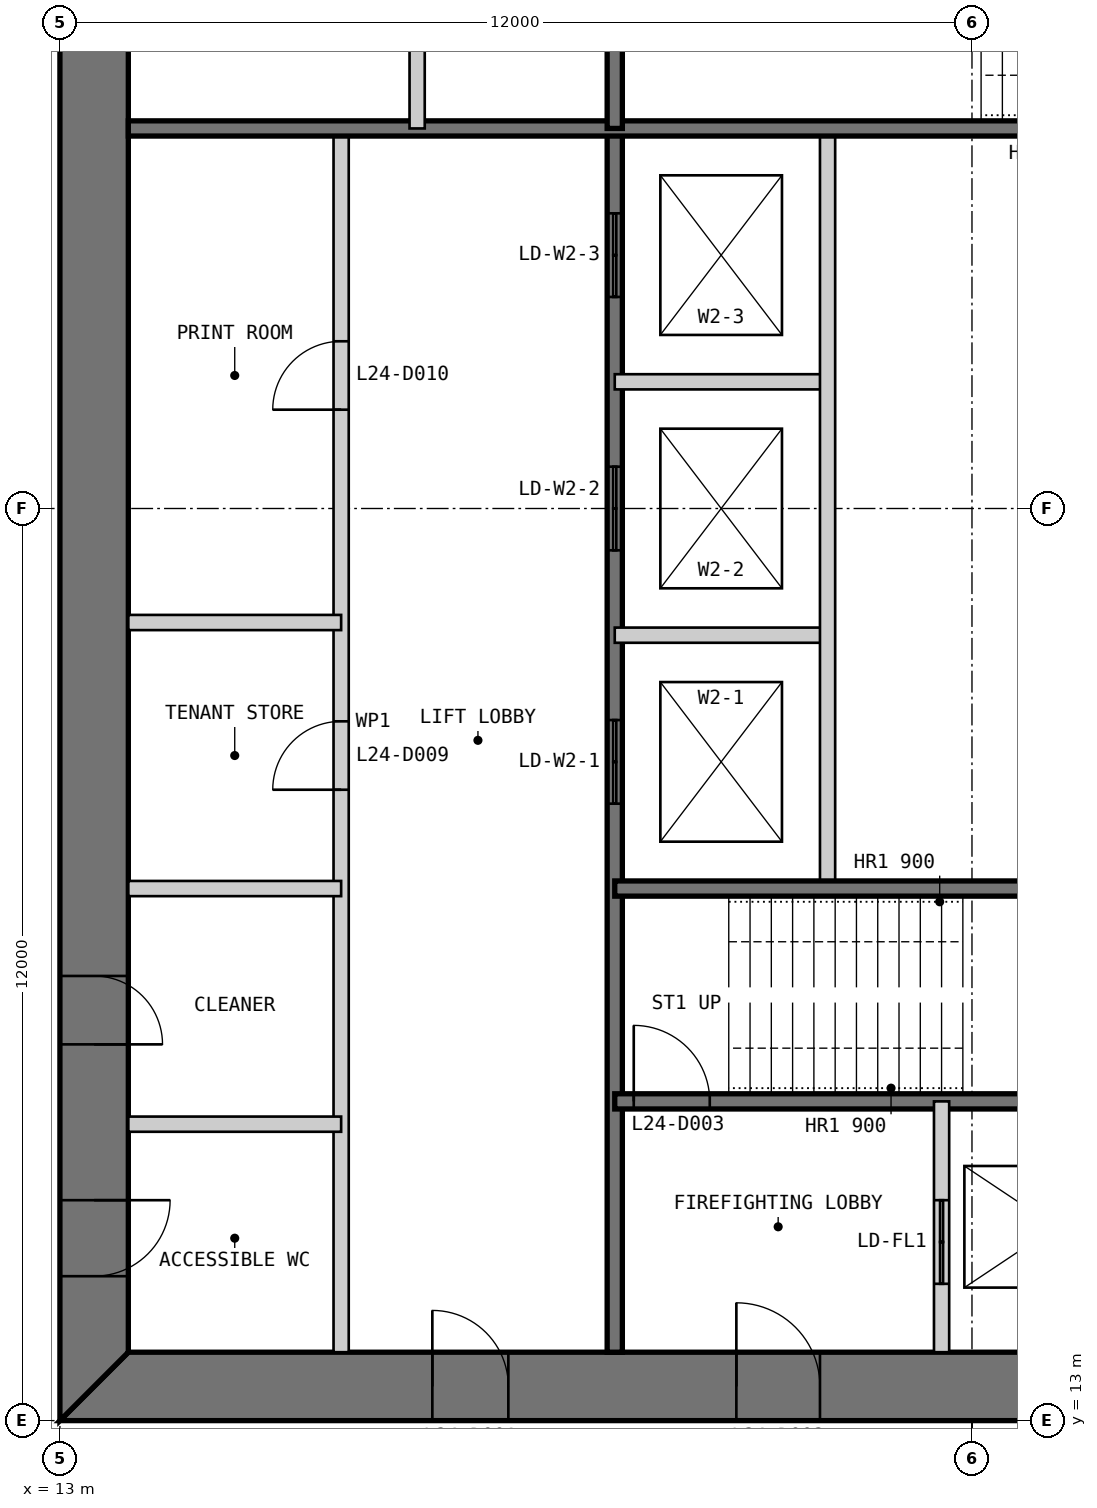
"""IFC4 building model, lengths in metres.
Left out: names, types, materials, properties, quantities, classifications, styles, units other than length and angle.
Written with IfcOpenShell. Run it as: python <this file> out.ifc"""

import sys

from ifc_helpers import new_model, si_unit, direction, frame, frame_2d, origin, place, context, subcontext, project, spatial, polyline, rectangle, outline, extrude, element, fill, save


model = new_model("IFC4")
c1 = context("Model", 3, precision=1e-05, world=origin(), true_north=direction((0.0, 1.0)))
c2 = subcontext(c1, "Body", "Model", "MODEL_VIEW")
j1 = project(units=[si_unit("LENGTHUNIT", "METRE"), si_unit("PLANEANGLEUNIT", "RADIAN")], contexts=[c1])
p1 = place(None, origin())
s1 = spatial("IfcSite", under=j1, at=p1, CompositionType="ELEMENT")
p2 = place(p1, origin())
s2 = spatial("IfcBuilding", under=s1, at=p2, CompositionType="ELEMENT")
p3 = place(p2, frame((0.0, 0.0, 106.4)))
s3 = spatial("IfcBuildingStorey", under=s2, at=p3, CompositionType="ELEMENT", Elevation=106.4)
p4 = place(p3, frame((13.0, 13.45, 0.0), z_axis=(0.0, 0.0, 1.0), x_axis=(1.0, 0.0, 0.0)))
e1 = element("IfcWall", 1, at=p4, inside=s3, PredefinedType="SHEAR", context=c2, shape_type="SweptSolid", body=[
    extrude(outline(polyline([(0.0, -0.45), (24.0, -0.45), (23.1, 0.45), (0.9, 0.45), (0.0, -0.45)])), origin(), (0.0, 0.0, 1.0), 4.0),
])
p5 = place(p4, frame((4.9, 0.0, 0.0)))
e2 = element("IfcOpeningElement", 2, at=p5, cuts=e1, PredefinedType="OPENING", context=c2, shape_type="SweptSolid", body=[
    extrude(rectangle(XDim=1.0, YDim=2.2, at=frame_2d((0.5, 1.1))), frame((0.0, 0.46, 0.0), z_axis=(0.0, -1.0, 0.0), x_axis=(1.0, 0.0, 0.0)), (0.0, 0.0, 1.0), 0.92),
])
p6 = place(p4, frame((8.9, 0.0, 0.0)))
e3 = element("IfcOpeningElement", 3, at=p6, cuts=e1, PredefinedType="OPENING", context=c2, shape_type="SweptSolid", body=[
    extrude(rectangle(XDim=1.1, YDim=2.2, at=frame_2d((0.55, 1.1))), frame((0.0, 0.46, 0.0), z_axis=(0.0, -1.0, 0.0), x_axis=(1.0, 0.0, 0.0)), (0.0, 0.0, 1.0), 0.92),
])
p7 = place(p4, frame((15.05, 0.0, 0.0)))
e4 = element("IfcOpeningElement", 4, at=p7, cuts=e1, PredefinedType="OPENING", context=c2, shape_type="SweptSolid", body=[
    extrude(rectangle(XDim=0.9, YDim=2.2, at=frame_2d((0.45, 1.1))), frame((0.0, 0.46, 0.0), z_axis=(0.0, -1.0, 0.0), x_axis=(1.0, 0.0, 0.0)), (0.0, 0.0, 1.0), 0.92),
])
p8 = place(p4, frame((17.9, 0.0, 0.0)))
e5 = element("IfcOpeningElement", 5, at=p8, cuts=e1, PredefinedType="OPENING", context=c2, shape_type="SweptSolid", body=[
    extrude(rectangle(XDim=1.0, YDim=2.2, at=frame_2d((0.5, 1.1))), frame((0.0, 0.46, 0.0), z_axis=(0.0, -1.0, 0.0), x_axis=(1.0, 0.0, 0.0)), (0.0, 0.0, 1.0), 0.92),
])
p9 = place(p4, frame((21.4, 0.0, 0.0)))
e6 = element("IfcOpeningElement", 6, at=p9, cuts=e1, PredefinedType="OPENING", context=c2, shape_type="SweptSolid", body=[
    extrude(rectangle(XDim=1.0, YDim=2.2, at=frame_2d((0.5, 1.1))), frame((0.0, 0.46, 0.0), z_axis=(0.0, -1.0, 0.0), x_axis=(1.0, 0.0, 0.0)), (0.0, 0.0, 1.0), 0.92),
])
p10 = place(p3, frame((13.45, 36.1, 0.0), z_axis=(0.0, 0.0, 1.0), x_axis=(0.0, -1.0, 0.0)))
e7 = element("IfcWall", 7, at=p10, inside=s3, PredefinedType="SHEAR", context=c2, shape_type="SweptSolid", body=[
    extrude(outline(polyline([(-0.9, -0.45), (23.1, -0.45), (22.2, 0.45), (0.0, 0.45), (-0.9, -0.45)])), origin(), (0.0, 0.0, 1.0), 4.0),
])
p11 = place(p10, frame((20.2, 0.0, 0.0)))
e8 = element("IfcOpeningElement", 8, at=p11, cuts=e7, PredefinedType="OPENING", context=c2, shape_type="SweptSolid", body=[
    extrude(rectangle(XDim=1.0, YDim=2.2, at=frame_2d((0.5, 1.1))), frame((0.0, 0.46, 0.0), z_axis=(0.0, -1.0, 0.0), x_axis=(1.0, 0.0, 0.0)), (0.0, 0.0, 1.0), 0.92),
])
p12 = place(p10, frame((17.25, 0.0, 0.0)))
e9 = element("IfcOpeningElement", 9, at=p12, cuts=e7, PredefinedType="OPENING", context=c2, shape_type="SweptSolid", body=[
    extrude(rectangle(XDim=0.9, YDim=2.2, at=frame_2d((0.45, 1.1))), frame((0.0, 0.46, 0.0), z_axis=(0.0, -1.0, 0.0), x_axis=(1.0, 0.0, 0.0)), (0.0, 0.0, 1.0), 0.92),
])
p13 = place(p3, frame((16.7, 13.9, 0.0), z_axis=(0.0, 0.0, 1.0), x_axis=(0.0, 1.0, 0.0)))
e10 = element("IfcWall", 10, at=p13, inside=s3, PredefinedType="PARTITIONING", context=c2, shape_type="SweptSolid", body=[
    extrude(rectangle(XDim=16.1, YDim=0.2, at=frame_2d((8.05, 0.0))), origin(), (0.0, 0.0, 1.0), 3.8),
])
p14 = place(p13, frame((7.4, 0.0, 0.0)))
e11 = element("IfcOpeningElement", 11, at=p14, cuts=e10, PredefinedType="OPENING", context=c2, shape_type="SweptSolid", body=[
    extrude(rectangle(XDim=0.9, YDim=2.2, at=frame_2d((0.45, 1.1))), frame((0.0, 0.11, 0.0), z_axis=(0.0, -1.0, 0.0), x_axis=(1.0, 0.0, 0.0)), (0.0, 0.0, 1.0), 0.22),
])
p15 = place(p13, frame((12.4, 0.0, 0.0)))
e12 = element("IfcOpeningElement", 12, at=p15, cuts=e10, PredefinedType="OPENING", context=c2, shape_type="SweptSolid", body=[
    extrude(rectangle(XDim=0.9, YDim=2.2, at=frame_2d((0.45, 1.1))), frame((0.0, 0.11, 0.0), z_axis=(0.0, -1.0, 0.0), x_axis=(1.0, 0.0, 0.0)), (0.0, 0.0, 1.0), 0.22),
])
p16 = place(p3, frame((20.3, 13.9, 0.0), z_axis=(0.0, 0.0, 1.0), x_axis=(0.0, 1.0, 0.0)))
e13 = element("IfcWall", 13, at=p16, inside=s3, PredefinedType="SOLIDWALL", context=c2, shape_type="SweptSolid", body=[
    extrude(rectangle(XDim=16.1, YDim=0.2, at=frame_2d((8.05, 0.0))), origin(), (0.0, 0.0, 1.0), 3.8),
])
p17 = place(p16, frame((7.217, 0.0, 0.0)))
e14 = element("IfcOpeningElement", 14, at=p17, cuts=e13, PredefinedType="OPENING", context=c2, shape_type="SweptSolid", body=[
    extrude(rectangle(XDim=1.1, YDim=2.2, at=frame_2d((0.55, 1.1))), frame((0.0, 0.11, 0.0), z_axis=(0.0, -1.0, 0.0), x_axis=(1.0, 0.0, 0.0)), (0.0, 0.0, 1.0), 0.22),
])
p18 = place(p16, frame((10.55, 0.0, 0.0)))
e15 = element("IfcOpeningElement", 15, at=p18, cuts=e13, PredefinedType="OPENING", context=c2, shape_type="SweptSolid", body=[
    extrude(rectangle(XDim=1.1, YDim=2.2, at=frame_2d((0.55, 1.1))), frame((0.0, 0.11, 0.0), z_axis=(0.0, -1.0, 0.0), x_axis=(1.0, 0.0, 0.0)), (0.0, 0.0, 1.0), 0.22),
])
p19 = place(p16, frame((13.883, 0.0, 0.0)))
e16 = element("IfcOpeningElement", 16, at=p19, cuts=e13, PredefinedType="OPENING", context=c2, shape_type="SweptSolid", body=[
    extrude(rectangle(XDim=1.1, YDim=2.2, at=frame_2d((0.55, 1.1))), frame((0.0, 0.11, 0.0), z_axis=(0.0, -1.0, 0.0), x_axis=(1.0, 0.0, 0.0)), (0.0, 0.0, 1.0), 0.22),
])
for number, where, z_axis, x_axis in (
    (17, (20.3, 23.333, 0.0), (0.0, 0.0, 1.0), (1.0, 0.0, 0.0)),
    (18, (20.3, 26.667, 0.0), (0.0, 0.0, 1.0), (1.0, 0.0, 0.0)),
):
    element("IfcWall", number, at=place(p3, frame(where, z_axis=z_axis, x_axis=x_axis)), inside=s3, PredefinedType="PARTITIONING", context=c2, shape_type="SweptSolid", body=[
        extrude(rectangle(XDim=2.8, YDim=0.2, at=frame_2d((1.4, 0.0))), origin(), (0.0, 0.0, 1.0), 3.8),
    ])
p20 = place(p3, frame((23.1, 20.0, 0.0), z_axis=(0.0, 0.0, 1.0), x_axis=(0.0, 1.0, 0.0)))
e19 = element("IfcWall", 19, at=p20, inside=s3, PredefinedType="PARTITIONING", context=c2, shape_type="SweptSolid", body=[
    extrude(rectangle(XDim=10.0, YDim=0.2, at=frame_2d((5.0, 0.0))), origin(), (0.0, 0.0, 1.0), 3.8),
])
p21 = place(p3, frame((20.3, 17.2, 0.0), z_axis=(0.0, 0.0, 1.0), x_axis=(1.0, 0.0, 0.0)))
e20 = element("IfcWall", 20, at=p21, inside=s3, PredefinedType="SOLIDWALL", context=c2, shape_type="SweptSolid", body=[
    extrude(rectangle(XDim=9.4, YDim=0.2, at=frame_2d((4.7, 0.0))), origin(), (0.0, 0.0, 1.0), 3.8),
])
p22 = place(p21, frame((0.25, 0.0, 0.0)))
e21 = element("IfcOpeningElement", 21, at=p22, cuts=e20, PredefinedType="OPENING", context=c2, shape_type="SweptSolid", body=[
    extrude(rectangle(XDim=1.0, YDim=2.2, at=frame_2d((0.5, 1.1))), frame((0.0, 0.11, 0.0), z_axis=(0.0, -1.0, 0.0), x_axis=(1.0, 0.0, 0.0)), (0.0, 0.0, 1.0), 0.22),
])
p23 = place(p3, frame((20.3, 20.0, 0.0), z_axis=(0.0, 0.0, 1.0), x_axis=(1.0, 0.0, 0.0)))
e22 = element("IfcWall", 22, at=p23, inside=s3, PredefinedType="SOLIDWALL", context=c2, shape_type="SweptSolid", body=[
    extrude(rectangle(XDim=15.8, YDim=0.2, at=frame_2d((7.9, 0.0))), origin(), (0.0, 0.0, 1.0), 3.8),
])
p24 = place(p3, frame((24.6, 13.9, 0.0), z_axis=(0.0, 0.0, 1.0), x_axis=(0.0, 1.0, 0.0)))
e23 = element("IfcWall", 23, at=p24, inside=s3, PredefinedType="PARTITIONING", context=c2, shape_type="SweptSolid", body=[
    extrude(rectangle(XDim=3.3, YDim=0.2, at=frame_2d((1.65, 0.0))), origin(), (0.0, 0.0, 1.0), 3.8),
])
p25 = place(p24, frame((0.9, 0.0, 0.0)))
e24 = element("IfcOpeningElement", 24, at=p25, cuts=e23, PredefinedType="OPENING", context=c2, shape_type="SweptSolid", body=[
    extrude(rectangle(XDim=1.1, YDim=2.2, at=frame_2d((0.55, 1.1))), frame((0.0, 0.11, 0.0), z_axis=(0.0, -1.0, 0.0), x_axis=(1.0, 0.0, 0.0)), (0.0, 0.0, 1.0), 0.22),
])
for number, where, z_axis, x_axis in (
    (25, (13.9, 16.9, 0.0), (0.0, 0.0, 1.0), (1.0, 0.0, 0.0)),
    (26, (13.9, 20.0, 0.0), (0.0, 0.0, 1.0), (1.0, 0.0, 0.0)),
    (27, (13.9, 23.5, 0.0), (0.0, 0.0, 1.0), (1.0, 0.0, 0.0)),
):
    element("IfcWall", number, at=place(p3, frame(where, z_axis=z_axis, x_axis=x_axis)), inside=s3, PredefinedType="PARTITIONING", context=c2, shape_type="SweptSolid", body=[
        extrude(rectangle(XDim=2.8, YDim=0.2, at=frame_2d((1.4, 0.0))), origin(), (0.0, 0.0, 1.0), 3.8),
    ])
p26 = place(p3, frame((29.7, 30.0, 0.0), z_axis=(0.0, 0.0, 1.0), x_axis=(-1.0, 0.0, 0.0)))
e28 = element("IfcWall", 28, at=p26, inside=s3, PredefinedType="SOLIDWALL", context=c2, shape_type="SweptSolid", body=[
    extrude(rectangle(XDim=15.8, YDim=0.2, at=frame_2d((7.9, 0.0))), origin(), (0.0, 0.0, 1.0), 3.8),
])
p27 = place(p3, frame((20.3, 36.1, 0.0), z_axis=(0.0, 0.0, 1.0), x_axis=(0.0, -1.0, 0.0)))
e29 = element("IfcWall", 29, at=p27, inside=s3, PredefinedType="SOLIDWALL", context=c2, shape_type="SweptSolid", body=[
    extrude(rectangle(XDim=6.1, YDim=0.2, at=frame_2d((3.05, 0.0))), origin(), (0.0, 0.0, 1.0), 3.8),
])
p28 = place(p3, frame((17.7, 36.1, 0.0), z_axis=(0.0, 0.0, 1.0), x_axis=(0.0, -1.0, 0.0)))
e30 = element("IfcWall", 30, at=p28, inside=s3, PredefinedType="PARTITIONING", context=c2, shape_type="SweptSolid", body=[
    extrude(rectangle(XDim=6.1, YDim=0.2, at=frame_2d((3.05, 0.0))), origin(), (0.0, 0.0, 1.0), 3.8),
])
p29 = place(p5, origin())
e31 = element("IfcDoor", 31, at=p29, inside=s3, OperationType="SINGLE_SWING_LEFT", PredefinedType="DOOR", context=c2, shape_type="SweptSolid", body=[
    extrude(rectangle(XDim=1.0, YDim=2.2, at=frame_2d((0.5, 1.1))), frame((0.0, 0.025, 0.0), z_axis=(0.0, -1.0, 0.0), x_axis=(1.0, 0.0, 0.0)), (0.0, 0.0, 1.0), 0.05),
    extrude(outline(polyline([(0.0, 0.0), (0.04, 0.0), (0.04, 2.16), (0.96, 2.16), (0.96, 0.0), (1.0, 0.0), (1.0, 2.2), (0.0, 2.2), (0.0, 0.0)])), frame((0.0, 0.3, 0.0), z_axis=(0.0, -1.0, 0.0), x_axis=(1.0, 0.0, 0.0)), (0.0, 0.0, 1.0), 0.6),
])
fill(e2, e31)
p30 = place(p6, origin())
e32 = element("IfcDoor", 32, at=p30, inside=s3, OperationType="SINGLE_SWING_LEFT", PredefinedType="DOOR", context=c2, shape_type="SweptSolid", body=[
    extrude(rectangle(XDim=1.1, YDim=2.2, at=frame_2d((0.55, 1.1))), frame((0.0, 0.025, 0.0), z_axis=(0.0, -1.0, 0.0), x_axis=(1.0, 0.0, 0.0)), (0.0, 0.0, 1.0), 0.05),
    extrude(outline(polyline([(0.0, 0.0), (0.04, 0.0), (0.04, 2.16), (1.06, 2.16), (1.06, 0.0), (1.1, 0.0), (1.1, 2.2), (0.0, 2.2), (0.0, 0.0)])), frame((0.0, 0.3, 0.0), z_axis=(0.0, -1.0, 0.0), x_axis=(1.0, 0.0, 0.0)), (0.0, 0.0, 1.0), 0.6),
])
fill(e3, e32)
p31 = place(p22, origin())
e33 = element("IfcDoor", 33, at=p31, inside=s3, OperationType="SINGLE_SWING_LEFT", PredefinedType="DOOR", context=c2, shape_type="SweptSolid", body=[
    extrude(rectangle(XDim=1.0, YDim=2.2, at=frame_2d((0.5, 1.1))), frame((0.0, 0.025, 0.0), z_axis=(0.0, -1.0, 0.0), x_axis=(1.0, 0.0, 0.0)), (0.0, 0.0, 1.0), 0.05),
])
fill(e21, e33)
p32 = place(p11, origin())
e34 = element("IfcDoor", 34, at=p32, inside=s3, OperationType="SINGLE_SWING_LEFT", PredefinedType="DOOR", context=c2, shape_type="SweptSolid", body=[
    extrude(rectangle(XDim=1.0, YDim=2.2, at=frame_2d((0.5, 1.1))), frame((0.0, 0.025, 0.0), z_axis=(0.0, -1.0, 0.0), x_axis=(1.0, 0.0, 0.0)), (0.0, 0.0, 1.0), 0.05),
    extrude(outline(polyline([(0.0, 0.0), (0.04, 0.0), (0.04, 2.16), (0.96, 2.16), (0.96, 0.0), (1.0, 0.0), (1.0, 2.2), (0.0, 2.2), (0.0, 0.0)])), frame((0.0, 0.3, 0.0), z_axis=(0.0, -1.0, 0.0), x_axis=(1.0, 0.0, 0.0)), (0.0, 0.0, 1.0), 0.6),
])
fill(e8, e34)
p33 = place(p12, origin())
e35 = element("IfcDoor", 35, at=p33, inside=s3, OperationType="SINGLE_SWING_RIGHT", PredefinedType="DOOR", context=c2, shape_type="SweptSolid", body=[
    extrude(rectangle(XDim=0.9, YDim=2.2, at=frame_2d((0.45, 1.1))), frame((0.0, 0.025, 0.0), z_axis=(0.0, -1.0, 0.0), x_axis=(1.0, 0.0, 0.0)), (0.0, 0.0, 1.0), 0.05),
    extrude(outline(polyline([(0.0, 0.0), (0.04, 0.0), (0.04, 2.16), (0.86, 2.16), (0.86, 0.0), (0.9, 0.0), (0.9, 2.2), (0.0, 2.2), (0.0, 0.0)])), frame((0.0, 0.3, 0.0), z_axis=(0.0, -1.0, 0.0), x_axis=(1.0, 0.0, 0.0)), (0.0, 0.0, 1.0), 0.6),
])
fill(e9, e35)
p34 = place(p14, origin())
e36 = element("IfcDoor", 36, at=p34, inside=s3, OperationType="SINGLE_SWING_LEFT", PredefinedType="DOOR", context=c2, shape_type="SweptSolid", body=[
    extrude(rectangle(XDim=0.9, YDim=2.2, at=frame_2d((0.45, 1.1))), frame((0.0, 0.025, 0.0), z_axis=(0.0, -1.0, 0.0), x_axis=(1.0, 0.0, 0.0)), (0.0, 0.0, 1.0), 0.05),
])
fill(e11, e36)
p35 = place(p15, origin())
e37 = element("IfcDoor", 37, at=p35, inside=s3, OperationType="SINGLE_SWING_LEFT", PredefinedType="DOOR", context=c2, shape_type="SweptSolid", body=[
    extrude(rectangle(XDim=0.9, YDim=2.2, at=frame_2d((0.45, 1.1))), frame((0.0, 0.025, 0.0), z_axis=(0.0, -1.0, 0.0), x_axis=(1.0, 0.0, 0.0)), (0.0, 0.0, 1.0), 0.05),
])
fill(e12, e37)
p36 = place(p25, origin())
e38 = element("IfcDoor", 38, at=p36, inside=s3, OperationType="DOUBLE_DOOR_SLIDING", PredefinedType="DOOR", context=c2, shape_type="SweptSolid", body=[
    extrude(rectangle(XDim=1.1, YDim=2.2, at=frame_2d((0.55, 1.1))), frame((0.0, 0.025, 0.0), z_axis=(0.0, -1.0, 0.0), x_axis=(1.0, 0.0, 0.0)), (0.0, 0.0, 1.0), 0.05),
])
fill(e24, e38)
p37 = place(p17, origin())
e39 = element("IfcDoor", 39, at=p37, inside=s3, OperationType="DOUBLE_DOOR_SLIDING", PredefinedType="DOOR", context=c2, shape_type="SweptSolid", body=[
    extrude(rectangle(XDim=1.1, YDim=2.2, at=frame_2d((0.55, 1.1))), frame((0.0, 0.025, 0.0), z_axis=(0.0, -1.0, 0.0), x_axis=(1.0, 0.0, 0.0)), (0.0, 0.0, 1.0), 0.05),
])
fill(e14, e39)
p38 = place(p18, origin())
e40 = element("IfcDoor", 40, at=p38, inside=s3, OperationType="DOUBLE_DOOR_SLIDING", PredefinedType="DOOR", context=c2, shape_type="SweptSolid", body=[
    extrude(rectangle(XDim=1.1, YDim=2.2, at=frame_2d((0.55, 1.1))), frame((0.0, 0.025, 0.0), z_axis=(0.0, -1.0, 0.0), x_axis=(1.0, 0.0, 0.0)), (0.0, 0.0, 1.0), 0.05),
])
fill(e15, e40)
p39 = place(p19, origin())
e41 = element("IfcDoor", 41, at=p39, inside=s3, OperationType="DOUBLE_DOOR_SLIDING", PredefinedType="DOOR", context=c2, shape_type="SweptSolid", body=[
    extrude(rectangle(XDim=1.1, YDim=2.2, at=frame_2d((0.55, 1.1))), frame((0.0, 0.025, 0.0), z_axis=(0.0, -1.0, 0.0), x_axis=(1.0, 0.0, 0.0)), (0.0, 0.0, 1.0), 0.05),
])
fill(e16, e41)
save(model, sys.argv[1])
